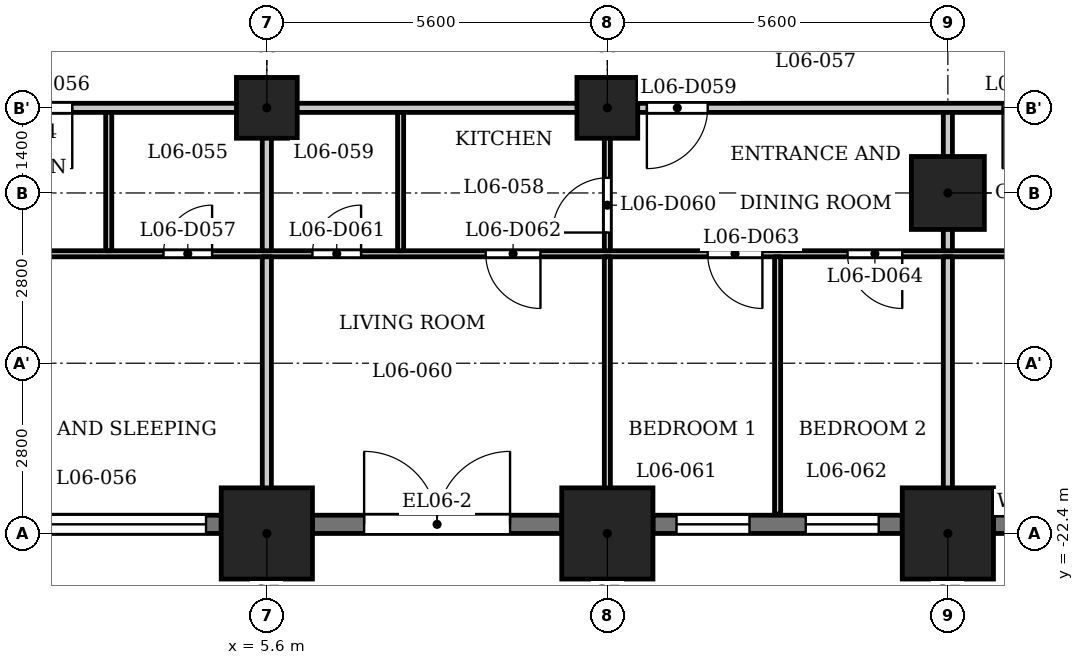
"""IFC4 building model, lengths in metres.
Left out: names, types, materials, properties, quantities, classifications, styles, units other than length and angle.
Written with IfcOpenShell. Run it as: python <this file> out.ifc"""

import sys

from ifc_helpers import new_model, si_unit, direction, frame, frame_2d, origin, origin_2d, place, context, subcontext, project, spatial, rectangle, extrude, element, fill, save


model = new_model("IFC4")
c1 = context("Model", 3, precision=1e-05, world=origin(), true_north=direction((0.0, 1.0)))
c2 = subcontext(c1, "Body", "Model", "MODEL_VIEW")
j1 = project(units=[si_unit("LENGTHUNIT", "METRE"), si_unit("PLANEANGLEUNIT", "RADIAN")], contexts=[c1])
p1 = place(None, origin())
s1 = spatial("IfcSite", under=j1, at=p1, CompositionType="ELEMENT")
p2 = place(p1, origin())
s2 = spatial("IfcBuilding", under=s1, at=p2, CompositionType="ELEMENT")
p3 = place(p2, frame((0.0, 0.0, 30.5)))
s3 = spatial("IfcBuildingStorey", under=s2, at=p3, CompositionType="ELEMENT", Elevation=30.5)
for number, where, z_axis, x_axis in (
    (1, (5.6, -22.4, 0.0), (0.0, 0.0, 1.0), (1.0, 0.0, 0.0)),
    (2, (11.2, -22.4, 0.0), (0.0, 0.0, 1.0), (1.0, 0.0, 0.0)),
    (3, (16.8, -22.4, 0.0), (0.0, 0.0, 1.0), (1.0, 0.0, 0.0)),
):
    element("IfcColumn", number, at=place(p3, frame(where, z_axis=z_axis, x_axis=x_axis)), inside=s3, PredefinedType="COLUMN", context=c2, shape_type="SweptSolid", body=[
        extrude(rectangle(XDim=1.5, YDim=1.5, at=origin_2d()), origin(), (0.0, 0.0, 1.0), 3.5),
    ])
p4 = place(p3, frame((16.8, -16.8, 0.0), z_axis=(0.0, 0.0, 1.0), x_axis=(1.0, 0.0, 0.0)))
e4 = element("IfcColumn", 4, at=p4, inside=s3, PredefinedType="COLUMN", context=c2, shape_type="SweptSolid", body=[
    extrude(rectangle(XDim=1.2, YDim=1.2, at=origin_2d()), origin(), (0.0, 0.0, 1.0), 3.5),
])
for number, where, z_axis, x_axis in (
    (5, (5.6, -15.4, 0.0), (0.0, 0.0, 1.0), (1.0, 0.0, 0.0)),
    (6, (11.2, -15.4, 0.0), (0.0, 0.0, 1.0), (1.0, 0.0, 0.0)),
):
    element("IfcColumn", number, at=place(p3, frame(where, z_axis=z_axis, x_axis=x_axis)), inside=s3, PredefinedType="COLUMN", context=c2, shape_type="SweptSolid", body=[
        extrude(rectangle(XDim=1.0, YDim=1.0, at=origin_2d()), origin(), (0.0, 0.0, 1.0), 3.5),
    ])
p5 = place(p3, frame((0.75, -22.25, 0.0), z_axis=(0.0, 0.0, 1.0), x_axis=(1.0, 0.0, 0.0)))
e7 = element("IfcWall", 7, at=p5, inside=s3, PredefinedType="SOLIDWALL", context=c2, shape_type="SweptSolid", body=[
    extrude(rectangle(XDim=4.1, YDim=0.3, at=frame_2d((2.05, 0.0))), origin(), (0.0, 0.0, 1.0), 2.35),
])
p6 = place(p5, frame((0.25, 0.0, 1.2)))
e8 = element("IfcOpeningElement", 8, at=p6, cuts=e7, PredefinedType="OPENING", context=c2, shape_type="SweptSolid", body=[
    extrude(rectangle(XDim=3.6, YDim=0.95, at=frame_2d((1.8, 0.475))), frame((0.0, 0.16, 0.0), z_axis=(0.0, -1.0, 0.0), x_axis=(1.0, 0.0, 0.0)), (0.0, 0.0, 1.0), 0.32),
])
p7 = place(p3, frame((6.35, -22.25, 0.0), z_axis=(0.0, 0.0, 1.0), x_axis=(1.0, 0.0, 0.0)))
e9 = element("IfcWall", 9, at=p7, inside=s3, PredefinedType="SOLIDWALL", context=c2, shape_type="SweptSolid", body=[
    extrude(rectangle(XDim=4.1, YDim=0.3, at=frame_2d((2.05, 0.0))), origin(), (0.0, 0.0, 1.0), 2.35),
])
p8 = place(p7, frame((0.85, 0.0, 0.0)))
e10 = element("IfcOpeningElement", 10, at=p8, cuts=e9, PredefinedType="OPENING", context=c2, shape_type="SweptSolid", body=[
    extrude(rectangle(XDim=2.4, YDim=2.3, at=frame_2d((1.2, 1.15))), frame((0.0, 0.16, 0.0), z_axis=(0.0, -1.0, 0.0), x_axis=(1.0, 0.0, 0.0)), (0.0, 0.0, 1.0), 0.32),
])
p9 = place(p3, frame((11.95, -22.25, 0.0), z_axis=(0.0, 0.0, 1.0), x_axis=(1.0, 0.0, 0.0)))
e11 = element("IfcWall", 11, at=p9, inside=s3, PredefinedType="SOLIDWALL", context=c2, shape_type="SweptSolid", body=[
    extrude(rectangle(XDim=4.1, YDim=0.3, at=frame_2d((2.05, 0.0))), origin(), (0.0, 0.0, 1.0), 2.35),
])
p10 = place(p9, frame((0.387, 0.0, 0.6)))
e12 = element("IfcOpeningElement", 12, at=p10, cuts=e11, PredefinedType="OPENING", context=c2, shape_type="SweptSolid", body=[
    extrude(rectangle(XDim=1.2, YDim=1.55, at=frame_2d((0.6, 0.775))), frame((0.0, 0.16, 0.0), z_axis=(0.0, -1.0, 0.0), x_axis=(1.0, 0.0, 0.0)), (0.0, 0.0, 1.0), 0.32),
])
p11 = place(p9, frame((2.512, 0.0, 0.6)))
e13 = element("IfcOpeningElement", 13, at=p11, cuts=e11, PredefinedType="OPENING", context=c2, shape_type="SweptSolid", body=[
    extrude(rectangle(XDim=1.2, YDim=1.55, at=frame_2d((0.6, 0.775))), frame((0.0, 0.16, 0.0), z_axis=(0.0, -1.0, 0.0), x_axis=(1.0, 0.0, 0.0)), (0.0, 0.0, 1.0), 0.32),
])
p12 = place(p3, frame((17.55, -22.25, 0.0), z_axis=(0.0, 0.0, 1.0), x_axis=(1.0, 0.0, 0.0)))
e14 = element("IfcWall", 14, at=p12, inside=s3, PredefinedType="SOLIDWALL", context=c2, shape_type="SweptSolid", body=[
    extrude(rectangle(XDim=2.45, YDim=0.3, at=frame_2d((1.225, 0.0))), origin(), (0.0, 0.0, 1.0), 2.35),
])
p13 = place(p12, frame((0.325, 0.0, 0.9)))
e15 = element("IfcOpeningElement", 15, at=p13, cuts=e14, PredefinedType="OPENING", context=c2, shape_type="SweptSolid", body=[
    extrude(rectangle(XDim=1.8, YDim=1.25, at=frame_2d((0.9, 0.625))), frame((0.0, 0.16, 0.0), z_axis=(0.0, -1.0, 0.0), x_axis=(1.0, 0.0, 0.0)), (0.0, 0.0, 1.0), 0.32),
])
p14 = place(p3, frame((-26.394, -17.8, 0.0), z_axis=(0.0, 0.0, 1.0), x_axis=(1.0, 0.0, 0.0)))
e16 = element("IfcWall", 16, at=p14, inside=s3, PredefinedType="PARTITIONING", context=c2, shape_type="SweptSolid", body=[
    extrude(rectangle(XDim=53.126, YDim=0.1, at=frame_2d((26.563, 0.0))), origin(), (0.0, 0.0, 1.0), 3.2),
])
p15 = place(p14, frame((0.794, 0.0, 0.0)))
e17 = element("IfcOpeningElement", 17, at=p15, cuts=e16, PredefinedType="OPENING", context=c2, shape_type="SweptSolid", body=[
    extrude(rectangle(XDim=0.8, YDim=2.1, at=frame_2d((0.4, 1.05))), frame((0.0, 0.06, 0.0), z_axis=(0.0, -1.0, 0.0), x_axis=(1.0, 0.0, 0.0)), (0.0, 0.0, 1.0), 0.12),
])
p16 = place(p14, frame((5.644, 0.0, 0.0)))
e18 = element("IfcOpeningElement", 18, at=p16, cuts=e16, PredefinedType="OPENING", context=c2, shape_type="SweptSolid", body=[
    extrude(rectangle(XDim=0.9, YDim=2.1, at=frame_2d((0.45, 1.05))), frame((0.0, 0.06, 0.0), z_axis=(0.0, -1.0, 0.0), x_axis=(1.0, 0.0, 0.0)), (0.0, 0.0, 1.0), 0.12),
])
p17 = place(p14, frame((13.244, 0.0, 0.0)))
e19 = element("IfcOpeningElement", 19, at=p17, cuts=e16, PredefinedType="OPENING", context=c2, shape_type="SweptSolid", body=[
    extrude(rectangle(XDim=0.8, YDim=2.1, at=frame_2d((0.4, 1.05))), frame((0.0, 0.06, 0.0), z_axis=(0.0, -1.0, 0.0), x_axis=(1.0, 0.0, 0.0)), (0.0, 0.0, 1.0), 0.12),
])
p18 = place(p14, frame((11.494, 0.0, 0.0)))
e20 = element("IfcOpeningElement", 20, at=p18, cuts=e16, PredefinedType="OPENING", context=c2, shape_type="SweptSolid", body=[
    extrude(rectangle(XDim=0.9, YDim=2.1, at=frame_2d((0.45, 1.05))), frame((0.0, 0.06, 0.0), z_axis=(0.0, -1.0, 0.0), x_axis=(1.0, 0.0, 0.0)), (0.0, 0.0, 1.0), 0.12),
])
p19 = place(p14, frame((19.344, 0.0, 0.0)))
e21 = element("IfcOpeningElement", 21, at=p19, cuts=e16, PredefinedType="OPENING", context=c2, shape_type="SweptSolid", body=[
    extrude(rectangle(XDim=0.8, YDim=2.1, at=frame_2d((0.4, 1.05))), frame((0.0, 0.06, 0.0), z_axis=(0.0, -1.0, 0.0), x_axis=(1.0, 0.0, 0.0)), (0.0, 0.0, 1.0), 0.12),
])
p20 = place(p14, frame((16.094, 0.0, 0.0)))
e22 = element("IfcOpeningElement", 22, at=p20, cuts=e16, PredefinedType="OPENING", context=c2, shape_type="SweptSolid", body=[
    extrude(rectangle(XDim=0.9, YDim=2.1, at=frame_2d((0.45, 1.05))), frame((0.0, 0.06, 0.0), z_axis=(0.0, -1.0, 0.0), x_axis=(1.0, 0.0, 0.0)), (0.0, 0.0, 1.0), 0.12),
])
p21 = place(p14, frame((24.944, 0.0, 0.0)))
e23 = element("IfcOpeningElement", 23, at=p21, cuts=e16, PredefinedType="OPENING", context=c2, shape_type="SweptSolid", body=[
    extrude(rectangle(XDim=0.8, YDim=2.1, at=frame_2d((0.4, 1.05))), frame((0.0, 0.06, 0.0), z_axis=(0.0, -1.0, 0.0), x_axis=(1.0, 0.0, 0.0)), (0.0, 0.0, 1.0), 0.12),
])
p22 = place(p14, frame((22.444, 0.0, 0.0)))
e24 = element("IfcOpeningElement", 24, at=p22, cuts=e16, PredefinedType="OPENING", context=c2, shape_type="SweptSolid", body=[
    extrude(rectangle(XDim=0.9, YDim=2.1, at=frame_2d((0.45, 1.05))), frame((0.0, 0.06, 0.0), z_axis=(0.0, -1.0, 0.0), x_axis=(1.0, 0.0, 0.0)), (0.0, 0.0, 1.0), 0.12),
])
p23 = place(p14, frame((30.294, 0.0, 0.0)))
e25 = element("IfcOpeningElement", 25, at=p23, cuts=e16, PredefinedType="OPENING", context=c2, shape_type="SweptSolid", body=[
    extrude(rectangle(XDim=0.8, YDim=2.1, at=frame_2d((0.4, 1.05))), frame((0.0, 0.06, 0.0), z_axis=(0.0, -1.0, 0.0), x_axis=(1.0, 0.0, 0.0)), (0.0, 0.0, 1.0), 0.12),
])
p24 = place(p14, frame((26.794, 0.0, 0.0)))
e26 = element("IfcOpeningElement", 26, at=p24, cuts=e16, PredefinedType="OPENING", context=c2, shape_type="SweptSolid", body=[
    extrude(rectangle(XDim=0.9, YDim=2.1, at=frame_2d((0.45, 1.05))), frame((0.0, 0.06, 0.0), z_axis=(0.0, -1.0, 0.0), x_axis=(1.0, 0.0, 0.0)), (0.0, 0.0, 1.0), 0.12),
])
p25 = place(p14, frame((32.744, 0.0, 0.0)))
e27 = element("IfcOpeningElement", 27, at=p25, cuts=e16, PredefinedType="OPENING", context=c2, shape_type="SweptSolid", body=[
    extrude(rectangle(XDim=0.8, YDim=2.1, at=frame_2d((0.4, 1.05))), frame((0.0, 0.06, 0.0), z_axis=(0.0, -1.0, 0.0), x_axis=(1.0, 0.0, 0.0)), (0.0, 0.0, 1.0), 0.12),
])
p26 = place(p14, frame((35.594, 0.0, 0.0)))
e28 = element("IfcOpeningElement", 28, at=p26, cuts=e16, PredefinedType="OPENING", context=c2, shape_type="SweptSolid", body=[
    extrude(rectangle(XDim=0.9, YDim=2.1, at=frame_2d((0.45, 1.05))), frame((0.0, 0.06, 0.0), z_axis=(0.0, -1.0, 0.0), x_axis=(1.0, 0.0, 0.0)), (0.0, 0.0, 1.0), 0.12),
])
p27 = place(p14, frame((39.244, 0.0, 0.0)))
e29 = element("IfcOpeningElement", 29, at=p27, cuts=e16, PredefinedType="OPENING", context=c2, shape_type="SweptSolid", body=[
    extrude(rectangle(XDim=0.9, YDim=2.1, at=frame_2d((0.45, 1.05))), frame((0.0, 0.06, 0.0), z_axis=(0.0, -1.0, 0.0), x_axis=(1.0, 0.0, 0.0)), (0.0, 0.0, 1.0), 0.12),
])
p28 = place(p14, frame((41.544, 0.0, 0.0)))
e30 = element("IfcOpeningElement", 30, at=p28, cuts=e16, PredefinedType="OPENING", context=c2, shape_type="SweptSolid", body=[
    extrude(rectangle(XDim=0.9, YDim=2.1, at=frame_2d((0.45, 1.05))), frame((0.0, 0.06, 0.0), z_axis=(0.0, -1.0, 0.0), x_axis=(1.0, 0.0, 0.0)), (0.0, 0.0, 1.0), 0.12),
])
p29 = place(p14, frame((49.362, 0.0, 0.0)))
e31 = element("IfcOpeningElement", 31, at=p29, cuts=e16, PredefinedType="OPENING", context=c2, shape_type="SweptSolid", body=[
    extrude(rectangle(XDim=0.8, YDim=2.1, at=frame_2d((0.4, 1.05))), frame((0.0, 0.06, 0.0), z_axis=(0.0, -1.0, 0.0), x_axis=(1.0, 0.0, 0.0)), (0.0, 0.0, 1.0), 0.12),
])
p30 = place(p14, frame((45.094, 0.0, 0.0)))
e32 = element("IfcOpeningElement", 32, at=p30, cuts=e16, PredefinedType="OPENING", context=c2, shape_type="SweptSolid", body=[
    extrude(rectangle(XDim=0.9, YDim=2.1, at=frame_2d((0.45, 1.05))), frame((0.0, 0.06, 0.0), z_axis=(0.0, -1.0, 0.0), x_axis=(1.0, 0.0, 0.0)), (0.0, 0.0, 1.0), 0.12),
])
p31 = place(p3, frame((-27.484, -15.4, 0.0), z_axis=(0.0, 0.0, 1.0), x_axis=(1.0, 0.0, 0.0)))
e33 = element("IfcWall", 33, at=p31, inside=s3, PredefinedType="PARTITIONING", context=c2, shape_type="SweptSolid", body=[
    extrude(rectangle(XDim=54.968, YDim=0.15, at=frame_2d((27.484, 0.0))), origin(), (0.0, 0.0, 1.0), 3.2),
])
p32 = place(p31, frame((5.734, 0.0, 0.0)))
e34 = element("IfcOpeningElement", 34, at=p32, cuts=e33, PredefinedType="OPENING", context=c2, shape_type="SweptSolid", body=[
    extrude(rectangle(XDim=1.0, YDim=2.1, at=frame_2d((0.5, 1.05))), frame((0.0, 0.085, 0.0), z_axis=(0.0, -1.0, 0.0), x_axis=(1.0, 0.0, 0.0)), (0.0, 0.0, 1.0), 0.17),
])
p33 = place(p31, frame((11.584, 0.0, 0.0)))
e35 = element("IfcOpeningElement", 35, at=p33, cuts=e33, PredefinedType="OPENING", context=c2, shape_type="SweptSolid", body=[
    extrude(rectangle(XDim=1.0, YDim=2.1, at=frame_2d((0.5, 1.05))), frame((0.0, 0.085, 0.0), z_axis=(0.0, -1.0, 0.0), x_axis=(1.0, 0.0, 0.0)), (0.0, 0.0, 1.0), 0.17),
])
p34 = place(p31, frame((17.184, 0.0, 0.0)))
e36 = element("IfcOpeningElement", 36, at=p34, cuts=e33, PredefinedType="OPENING", context=c2, shape_type="SweptSolid", body=[
    extrude(rectangle(XDim=1.0, YDim=2.1, at=frame_2d((0.5, 1.05))), frame((0.0, 0.085, 0.0), z_axis=(0.0, -1.0, 0.0), x_axis=(1.0, 0.0, 0.0)), (0.0, 0.0, 1.0), 0.17),
])
p35 = place(p31, frame((22.534, 0.0, 0.0)))
e37 = element("IfcOpeningElement", 37, at=p35, cuts=e33, PredefinedType="OPENING", context=c2, shape_type="SweptSolid", body=[
    extrude(rectangle(XDim=1.0, YDim=2.1, at=frame_2d((0.5, 1.05))), frame((0.0, 0.085, 0.0), z_axis=(0.0, -1.0, 0.0), x_axis=(1.0, 0.0, 0.0)), (0.0, 0.0, 1.0), 0.17),
])
p36 = place(p31, frame((28.884, 0.0, 0.0)))
e38 = element("IfcOpeningElement", 38, at=p36, cuts=e33, PredefinedType="OPENING", context=c2, shape_type="SweptSolid", body=[
    extrude(rectangle(XDim=1.0, YDim=2.1, at=frame_2d((0.5, 1.05))), frame((0.0, 0.085, 0.0), z_axis=(0.0, -1.0, 0.0), x_axis=(1.0, 0.0, 0.0)), (0.0, 0.0, 1.0), 0.17),
])
p37 = place(p31, frame((39.334, 0.0, 0.0)))
e39 = element("IfcOpeningElement", 39, at=p37, cuts=e33, PredefinedType="OPENING", context=c2, shape_type="SweptSolid", body=[
    extrude(rectangle(XDim=1.0, YDim=2.1, at=frame_2d((0.5, 1.05))), frame((0.0, 0.085, 0.0), z_axis=(0.0, -1.0, 0.0), x_axis=(1.0, 0.0, 0.0)), (0.0, 0.0, 1.0), 0.17),
])
p38 = place(p31, frame((45.184, 0.0, 0.0)))
e40 = element("IfcOpeningElement", 40, at=p38, cuts=e33, PredefinedType="OPENING", context=c2, shape_type="SweptSolid", body=[
    extrude(rectangle(XDim=1.0, YDim=2.1, at=frame_2d((0.5, 1.05))), frame((0.0, 0.085, 0.0), z_axis=(0.0, -1.0, 0.0), x_axis=(1.0, 0.0, 0.0)), (0.0, 0.0, 1.0), 0.17),
])
p39 = place(p3, frame((3.0, -17.75, 0.0), z_axis=(0.0, 0.0, 1.0), x_axis=(0.0, 1.0, 0.0)))
e41 = element("IfcWall", 41, at=p39, inside=s3, PredefinedType="PARTITIONING", context=c2, shape_type="SweptSolid", body=[
    extrude(rectangle(XDim=2.275, YDim=0.1, at=frame_2d((1.137, 0.0))), origin(), (0.0, 0.0, 1.0), 3.2),
])
p40 = place(p3, frame((5.6, -23.13, 0.0), z_axis=(0.0, 0.0, 1.0), x_axis=(0.0, 1.0, 0.0)))
e42 = element("IfcWall", 42, at=p40, inside=s3, PredefinedType="PARTITIONING", context=c2, shape_type="SweptSolid", body=[
    extrude(rectangle(XDim=5.28, YDim=0.15, at=frame_2d((2.64, 0.0))), origin(), (0.0, 0.0, 1.0), 3.2),
])
p41 = place(p3, frame((5.6, -17.75, 0.0), z_axis=(0.0, 0.0, 1.0), x_axis=(0.0, 1.0, 0.0)))
e43 = element("IfcWall", 43, at=p41, inside=s3, PredefinedType="PARTITIONING", context=c2, shape_type="SweptSolid", body=[
    extrude(rectangle(XDim=2.275, YDim=0.15, at=frame_2d((1.137, 0.0))), origin(), (0.0, 0.0, 1.0), 3.2),
])
p42 = place(p3, frame((7.8, -17.75, 0.0), z_axis=(0.0, 0.0, 1.0), x_axis=(0.0, 1.0, 0.0)))
e44 = element("IfcWall", 44, at=p42, inside=s3, PredefinedType="PARTITIONING", context=c2, shape_type="SweptSolid", body=[
    extrude(rectangle(XDim=2.275, YDim=0.1, at=frame_2d((1.137, 0.0))), origin(), (0.0, 0.0, 1.0), 3.2),
])
p43 = place(p3, frame((11.2, -23.13, 0.0), z_axis=(0.0, 0.0, 1.0), x_axis=(0.0, 1.0, 0.0)))
e45 = element("IfcWall", 45, at=p43, inside=s3, PredefinedType="PARTITIONING", context=c2, shape_type="SweptSolid", body=[
    extrude(rectangle(XDim=5.28, YDim=0.1, at=frame_2d((2.64, 0.0))), origin(), (0.0, 0.0, 1.0), 3.2),
])
p44 = place(p3, frame((11.2, -17.75, 0.0), z_axis=(0.0, 0.0, 1.0), x_axis=(0.0, 1.0, 0.0)))
e46 = element("IfcWall", 46, at=p44, inside=s3, PredefinedType="PARTITIONING", context=c2, shape_type="SweptSolid", body=[
    extrude(rectangle(XDim=2.275, YDim=0.1, at=frame_2d((1.137, 0.0))), origin(), (0.0, 0.0, 1.0), 3.2),
])
p45 = place(p44, frame((0.299, 0.0, 0.0)))
e47 = element("IfcOpeningElement", 47, at=p45, cuts=e46, PredefinedType="OPENING", context=c2, shape_type="SweptSolid", body=[
    extrude(rectangle(XDim=0.9, YDim=2.1, at=frame_2d((0.45, 1.05))), frame((0.0, 0.06, 0.0), z_axis=(0.0, -1.0, 0.0), x_axis=(1.0, 0.0, 0.0)), (0.0, 0.0, 1.0), 0.12),
])
p46 = place(p3, frame((14.0, -22.08, 0.0), z_axis=(0.0, 0.0, 1.0), x_axis=(0.0, 1.0, 0.0)))
e48 = element("IfcWall", 48, at=p46, inside=s3, PredefinedType="PARTITIONING", context=c2, shape_type="SweptSolid", body=[
    extrude(rectangle(XDim=4.23, YDim=0.1, at=frame_2d((2.115, 0.0))), origin(), (0.0, 0.0, 1.0), 3.2),
])
p47 = place(p3, frame((16.8, -23.13, 0.0), z_axis=(0.0, 0.0, 1.0), x_axis=(0.0, 1.0, 0.0)))
e49 = element("IfcWall", 49, at=p47, inside=s3, PredefinedType="PARTITIONING", context=c2, shape_type="SweptSolid", body=[
    extrude(rectangle(XDim=5.28, YDim=0.15, at=frame_2d((2.64, 0.0))), origin(), (0.0, 0.0, 1.0), 3.2),
])
p48 = place(p3, frame((16.8, -17.75, 0.0), z_axis=(0.0, 0.0, 1.0), x_axis=(0.0, 1.0, 0.0)))
e50 = element("IfcWall", 50, at=p48, inside=s3, PredefinedType="PARTITIONING", context=c2, shape_type="SweptSolid", body=[
    extrude(rectangle(XDim=2.275, YDim=0.15, at=frame_2d((1.137, 0.0))), origin(), (0.0, 0.0, 1.0), 3.2),
])
p49 = place(p8, origin())
e51 = element("IfcDoor", 51, at=p49, inside=s3, OperationType="SINGLE_SWING_LEFT", PredefinedType="DOOR", context=c2, shape_type="SweptSolid", body=[
    extrude(rectangle(XDim=2.4, YDim=2.3, at=frame_2d((1.2, 1.15))), frame((0.0, 0.025, 0.0), z_axis=(0.0, -1.0, 0.0), x_axis=(1.0, 0.0, 0.0)), (0.0, 0.0, 1.0), 0.05),
])
fill(e10, e51)
p50 = place(p36, origin())
e52 = element("IfcDoor", 52, at=p50, inside=s3, OperationType="SINGLE_SWING_RIGHT", PredefinedType="DOOR", context=c2, shape_type="SweptSolid", body=[
    extrude(rectangle(XDim=1.0, YDim=2.1, at=frame_2d((0.5, 1.05))), frame((0.0, 0.025, 0.0), z_axis=(0.0, -1.0, 0.0), x_axis=(1.0, 0.0, 0.0)), (0.0, 0.0, 1.0), 0.05),
])
fill(e38, e52)
p51 = place(p23, origin())
e53 = element("IfcDoor", 53, at=p51, inside=s3, OperationType="SINGLE_SWING_LEFT", PredefinedType="DOOR", context=c2, shape_type="SweptSolid", body=[
    extrude(rectangle(XDim=0.8, YDim=2.1, at=frame_2d((0.4, 1.05))), frame((0.0, 0.025, 0.0), z_axis=(0.0, -1.0, 0.0), x_axis=(1.0, 0.0, 0.0)), (0.0, 0.0, 1.0), 0.05),
])
fill(e25, e53)
p52 = place(p37, origin())
e54 = element("IfcDoor", 54, at=p52, inside=s3, OperationType="SINGLE_SWING_LEFT", PredefinedType="DOOR", context=c2, shape_type="SweptSolid", body=[
    extrude(rectangle(XDim=1.0, YDim=2.1, at=frame_2d((0.5, 1.05))), frame((0.0, 0.025, 0.0), z_axis=(0.0, -1.0, 0.0), x_axis=(1.0, 0.0, 0.0)), (0.0, 0.0, 1.0), 0.05),
])
fill(e39, e54)
p53 = place(p45, origin())
e55 = element("IfcDoor", 55, at=p53, inside=s3, OperationType="SINGLE_SWING_RIGHT", PredefinedType="DOOR", context=c2, shape_type="SweptSolid", body=[
    extrude(rectangle(XDim=0.9, YDim=2.1, at=frame_2d((0.45, 1.05))), frame((0.0, 0.025, 0.0), z_axis=(0.0, -1.0, 0.0), x_axis=(1.0, 0.0, 0.0)), (0.0, 0.0, 1.0), 0.05),
])
fill(e47, e55)
p54 = place(p25, origin())
e56 = element("IfcDoor", 56, at=p54, inside=s3, OperationType="SINGLE_SWING_LEFT", PredefinedType="DOOR", context=c2, shape_type="SweptSolid", body=[
    extrude(rectangle(XDim=0.8, YDim=2.1, at=frame_2d((0.4, 1.05))), frame((0.0, 0.025, 0.0), z_axis=(0.0, -1.0, 0.0), x_axis=(1.0, 0.0, 0.0)), (0.0, 0.0, 1.0), 0.05),
])
fill(e27, e56)
p55 = place(p26, origin())
e57 = element("IfcDoor", 57, at=p55, inside=s3, OperationType="SINGLE_SWING_RIGHT", PredefinedType="DOOR", context=c2, shape_type="SweptSolid", body=[
    extrude(rectangle(XDim=0.9, YDim=2.1, at=frame_2d((0.45, 1.05))), frame((0.0, 0.025, 0.0), z_axis=(0.0, -1.0, 0.0), x_axis=(1.0, 0.0, 0.0)), (0.0, 0.0, 1.0), 0.05),
])
fill(e28, e57)
p56 = place(p27, origin())
e58 = element("IfcDoor", 58, at=p56, inside=s3, OperationType="SINGLE_SWING_RIGHT", PredefinedType="DOOR", context=c2, shape_type="SweptSolid", body=[
    extrude(rectangle(XDim=0.9, YDim=2.1, at=frame_2d((0.45, 1.05))), frame((0.0, 0.025, 0.0), z_axis=(0.0, -1.0, 0.0), x_axis=(1.0, 0.0, 0.0)), (0.0, 0.0, 1.0), 0.05),
])
fill(e29, e58)
p57 = place(p28, origin())
e59 = element("IfcDoor", 59, at=p57, inside=s3, OperationType="SINGLE_SWING_RIGHT", PredefinedType="DOOR", context=c2, shape_type="SweptSolid", body=[
    extrude(rectangle(XDim=0.9, YDim=2.1, at=frame_2d((0.45, 1.05))), frame((0.0, 0.025, 0.0), z_axis=(0.0, -1.0, 0.0), x_axis=(1.0, 0.0, 0.0)), (0.0, 0.0, 1.0), 0.05),
])
fill(e30, e59)
p58 = place(p38, origin())
e60 = element("IfcDoor", 60, at=p58, inside=s3, OperationType="SINGLE_SWING_LEFT", PredefinedType="DOOR", context=c2, shape_type="SweptSolid", body=[
    extrude(rectangle(XDim=1.0, YDim=2.1, at=frame_2d((0.5, 1.05))), frame((0.0, 0.025, 0.0), z_axis=(0.0, -1.0, 0.0), x_axis=(1.0, 0.0, 0.0)), (0.0, 0.0, 1.0), 0.05),
])
fill(e40, e60)
p59 = place(p6, origin())
e61 = element("IfcWindow", 61, at=p59, inside=s3, PartitioningType="SINGLE_PANEL", PredefinedType="WINDOW", context=c2, shape_type="SweptSolid", body=[
    extrude(rectangle(XDim=3.6, YDim=0.95, at=frame_2d((1.8, 0.475))), frame((0.0, 0.03, 0.0), z_axis=(0.0, -1.0, 0.0), x_axis=(1.0, 0.0, 0.0)), (0.0, 0.0, 1.0), 0.06),
])
fill(e8, e61)
p60 = place(p10, origin())
e62 = element("IfcWindow", 62, at=p60, inside=s3, PartitioningType="SINGLE_PANEL", PredefinedType="WINDOW", context=c2, shape_type="SweptSolid", body=[
    extrude(rectangle(XDim=1.2, YDim=1.55, at=frame_2d((0.6, 0.775))), frame((0.0, 0.03, 0.0), z_axis=(0.0, -1.0, 0.0), x_axis=(1.0, 0.0, 0.0)), (0.0, 0.0, 1.0), 0.06),
])
fill(e12, e62)
p61 = place(p11, origin())
e63 = element("IfcWindow", 63, at=p61, inside=s3, PartitioningType="SINGLE_PANEL", PredefinedType="WINDOW", context=c2, shape_type="SweptSolid", body=[
    extrude(rectangle(XDim=1.2, YDim=1.55, at=frame_2d((0.6, 0.775))), frame((0.0, 0.03, 0.0), z_axis=(0.0, -1.0, 0.0), x_axis=(1.0, 0.0, 0.0)), (0.0, 0.0, 1.0), 0.06),
])
fill(e13, e63)
save(model, sys.argv[1])
